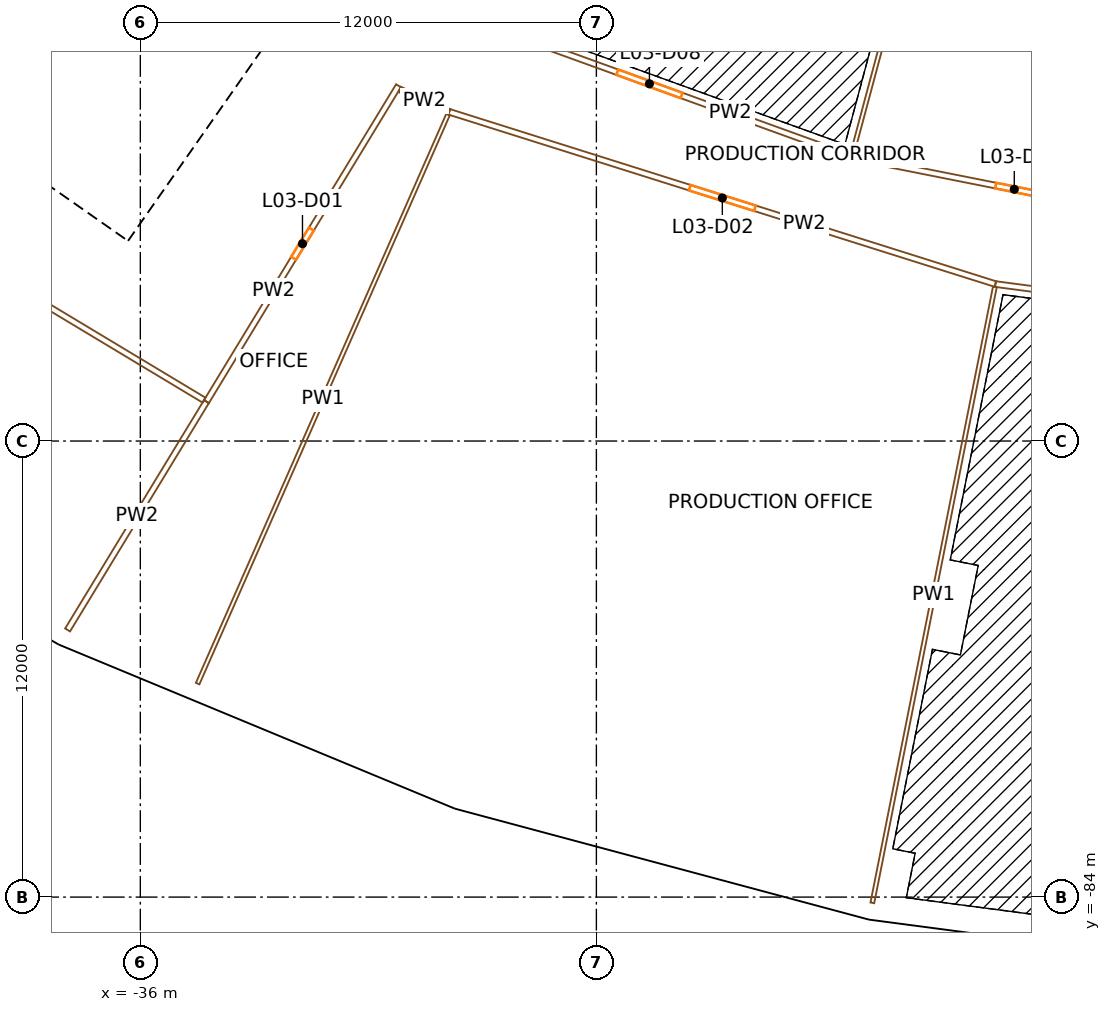
"""IFC4 building model, lengths in metres.
Left out: names, types, materials, properties, quantities, classifications, styles, units other than length and angle.
Written with IfcOpenShell. Run it as: python <this file> out.ifc"""

import sys

from ifc_helpers import new_model, si_unit, direction, frame, frame_2d, origin, origin_2d, place, context, subcontext, project, spatial, rectangle, extrude, element, fill, save


model = new_model("IFC4")
c1 = context("Model", 3, precision=1e-05, world=origin(), true_north=direction((0.0, 1.0)))
c2 = subcontext(c1, "Body", "Model", "MODEL_VIEW")
j1 = project(units=[si_unit("LENGTHUNIT", "METRE"), si_unit("PLANEANGLEUNIT", "RADIAN")], contexts=[c1])
p1 = place(None, origin())
s1 = spatial("IfcSite", under=j1, at=p1, CompositionType="ELEMENT")
p2 = place(p1, origin())
s2 = spatial("IfcBuilding", under=s1, at=p2, CompositionType="ELEMENT")
p3 = place(p2, frame((0.0, 0.0, 27.0)))
s3 = spatial("IfcBuildingStorey", under=s2, at=p3, CompositionType="ELEMENT", Elevation=27.0)
p4 = place(p3, frame((-34.388, -69.732, 0.0), z_axis=(0.0, 0.0, 1.0), x_axis=(0.896872741533, -0.442288690219, 0.0)))
e1 = element("IfcColumn", 1, at=p4, inside=s3, PredefinedType="COLUMN", context=c2, shape_type="SweptSolid", body=[
    extrude(rectangle(XDim=1.4, YDim=1.8, at=origin_2d()), origin(), (0.0, 0.0, 1.0), 4.5),
])
p5 = place(p3, frame((-37.705, -76.458, 0.0), z_axis=(0.0, 0.0, 1.0), x_axis=(0.896872741533, -0.442288690219, 0.0)))
e2 = element("IfcColumn", 2, at=p5, inside=s3, PredefinedType="COLUMN", context=c2, shape_type="SweptSolid", body=[
    extrude(rectangle(XDim=1.1, YDim=1.3, at=origin_2d()), origin(), (0.0, 0.0, 1.0), 4.5),
])
p6 = place(p3, frame((-24.992, -73.624, 0.0), z_axis=(0.0, 0.0, 1.0), x_axis=(0.946930129495, -0.321439465303, 0.0)))
e3 = element("IfcColumn", 3, at=p6, inside=s3, PredefinedType="COLUMN", context=c2, shape_type="SweptSolid", body=[
    extrude(rectangle(XDim=1.4, YDim=1.8, at=origin_2d()), origin(), (0.0, 0.0, 1.0), 4.5),
])
p7 = place(p3, frame((-27.403, -80.726, 0.0), z_axis=(0.0, 0.0, 1.0), x_axis=(0.946930129495, -0.321439465303, 0.0)))
e4 = element("IfcColumn", 4, at=p7, inside=s3, PredefinedType="COLUMN", context=c2, shape_type="SweptSolid", body=[
    extrude(rectangle(XDim=1.1, YDim=1.3, at=origin_2d()), origin(), (0.0, 0.0, 1.0), 4.5),
])
p8 = place(p3, frame((-15.168, -76.256, 0.0), z_axis=(0.0, 0.0, 1.0), x_axis=(0.980785280403, -0.195090322016, 0.0)))
e5 = element("IfcColumn", 5, at=p8, inside=s3, PredefinedType="COLUMN", context=c2, shape_type="SweptSolid", body=[
    extrude(rectangle(XDim=1.4, YDim=1.8, at=origin_2d()), origin(), (0.0, 0.0, 1.0), 4.5),
])
p9 = place(p3, frame((-16.631, -83.612, 0.0), z_axis=(0.0, 0.0, 1.0), x_axis=(0.980785280403, -0.195090322016, 0.0)))
e6 = element("IfcColumn", 6, at=p9, inside=s3, PredefinedType="COLUMN", context=c2, shape_type="SweptSolid", body=[
    extrude(rectangle(XDim=1.1, YDim=1.3, at=origin_2d()), origin(), (0.0, 0.0, 1.0), 4.5),
])
p10 = place(p3, frame((-36.717, -66.337, 0.0), z_axis=(0.0, 0.0, 1.0), x_axis=(0.573577477574, 0.819151315216, 0.0)))
e7 = element("IfcWall", 7, at=p10, inside=s3, PredefinedType="SHEAR", context=c2, shape_type="SweptSolid", body=[
    extrude(rectangle(XDim=14.8, YDim=0.9, at=frame_2d((7.4, 0.0))), origin(), (0.0, 0.0, 1.0), 4.1),
])
p11 = place(p10, frame((6.2, 0.0, 0.0)))
e8 = element("IfcOpeningElement", 8, at=p11, cuts=e7, PredefinedType="OPENING", context=c2, shape_type="SweptSolid", body=[
    extrude(rectangle(XDim=2.4, YDim=2.1, at=frame_2d((1.2, 1.05))), frame((0.0, 0.46, 0.0), z_axis=(0.0, -1.0, 0.0), x_axis=(1.0, 0.0, 0.0)), (0.0, 0.0, 1.0), 0.92),
])
p12 = place(p3, frame((-36.827, -65.71, 0.0), z_axis=(0.0, 0.0, 1.0), x_axis=(-0.819153391756, 0.573574511963, 0.0)))
e9 = element("IfcWall", 9, at=p12, inside=s3, PredefinedType="SHEAR", context=c2, shape_type="SweptSolid", body=[
    extrude(rectangle(XDim=15.045, YDim=0.9, at=frame_2d((7.523, 0.0))), origin(), (0.0, 0.0, 1.0), 4.1),
])
p13 = place(p12, frame((1.05, 0.0, 0.0)))
e10 = element("IfcOpeningElement", 10, at=p13, cuts=e9, PredefinedType="OPENING", context=c2, shape_type="SweptSolid", body=[
    extrude(rectangle(XDim=1.0, YDim=2.1, at=frame_2d((0.5, 1.05))), frame((0.0, 0.46, 0.0), z_axis=(0.0, -1.0, 0.0), x_axis=(1.0, 0.0, 0.0)), (0.0, 0.0, 1.0), 0.92),
])
p14 = place(p12, frame((3.625, 0.0, 0.0)))
e11 = element("IfcOpeningElement", 11, at=p14, cuts=e9, PredefinedType="OPENING", context=c2, shape_type="SweptSolid", body=[
    extrude(rectangle(XDim=1.0, YDim=2.1, at=frame_2d((0.5, 1.05))), frame((0.0, 0.46, 0.0), z_axis=(0.0, -1.0, 0.0), x_axis=(1.0, 0.0, 0.0)), (0.0, 0.0, 1.0), 0.92),
])
p15 = place(p12, frame((6.075, 0.0, 0.0)))
e12 = element("IfcOpeningElement", 12, at=p15, cuts=e9, PredefinedType="OPENING", context=c2, shape_type="SweptSolid", body=[
    extrude(rectangle(XDim=1.0, YDim=2.1, at=frame_2d((0.5, 1.05))), frame((0.0, 0.46, 0.0), z_axis=(0.0, -1.0, 0.0), x_axis=(1.0, 0.0, 0.0)), (0.0, 0.0, 1.0), 0.92),
])
p16 = place(p12, frame((13.495, 0.0, 0.0)))
e13 = element("IfcOpeningElement", 13, at=p16, cuts=e9, PredefinedType="OPENING", context=c2, shape_type="SweptSolid", body=[
    extrude(rectangle(XDim=1.1, YDim=2.1, at=frame_2d((0.55, 1.05))), frame((0.0, 0.46, 0.0), z_axis=(0.0, -1.0, 0.0), x_axis=(1.0, 0.0, 0.0)), (0.0, 0.0, 1.0), 0.92),
])
p17 = place(p3, frame((-35.221, -63.417, 0.0), z_axis=(0.0, 0.0, 1.0), x_axis=(-0.819166993208, 0.573555086491, 0.0)))
e14 = element("IfcWall", 14, at=p17, inside=s3, PredefinedType="SOLIDWALL", context=c2, shape_type="SweptSolid", body=[
    extrude(rectangle(XDim=7.95, YDim=0.3, at=frame_2d((3.975, 0.0))), origin(), (0.0, 0.0, 1.0), 4.1),
])
p18 = place(p3, frame((-37.929, -61.704, 0.0), z_axis=(0.0, 0.0, 1.0), x_axis=(-0.573559170999, -0.819164133348, 0.0)))
e15 = element("IfcWall", 15, at=p18, inside=s3, PredefinedType="PLUMBINGWALL", context=c2, shape_type="SweptSolid", body=[
    extrude(rectangle(XDim=2.2, YDim=0.1, at=frame_2d((1.1, 0.0))), origin(), (0.0, 0.0, 1.0), 4.1),
])
p19 = place(p3, frame((-47.819, -71.512, 0.0), z_axis=(0.0, 0.0, 1.0), x_axis=(0.866024577697, -0.500001430823, 0.0)))
e16 = element("IfcWall", 16, at=p19, inside=s3, PredefinedType="SOLIDWALL", context=c2, shape_type="SweptSolid", body=[
    extrude(rectangle(XDim=11.312, YDim=0.45, at=frame_2d((5.656, 0.0))), origin(), (0.0, 0.0, 1.0), 3.2),
])
p20 = place(p19, frame((4.006, 0.0, 0.9)))
e17 = element("IfcOpeningElement", 17, at=p20, cuts=e16, PredefinedType="OPENING", context=c2, shape_type="SweptSolid", body=[
    extrude(rectangle(XDim=1.2, YDim=2.15, at=frame_2d((0.6, 1.075))), frame((0.0, 0.235, 0.0), z_axis=(0.0, -1.0, 0.0), x_axis=(1.0, 0.0, 0.0)), (0.0, 0.0, 1.0), 0.47),
])
p21 = place(p19, frame((6.106, 0.0, 0.9)))
e18 = element("IfcOpeningElement", 18, at=p21, cuts=e16, PredefinedType="OPENING", context=c2, shape_type="SweptSolid", body=[
    extrude(rectangle(XDim=1.2, YDim=2.15, at=frame_2d((0.6, 1.075))), frame((0.0, 0.235, 0.0), z_axis=(0.0, -1.0, 0.0), x_axis=(1.0, 0.0, 0.0)), (0.0, 0.0, 1.0), 0.47),
])
p22 = place(p3, frame((-37.993, -77.176, 0.0), z_axis=(0.0, 0.0, 1.0), x_axis=(0.923874126662, -0.382696482978, 0.0)))
e19 = element("IfcWall", 19, at=p22, inside=s3, PredefinedType="SOLIDWALL", context=c2, shape_type="SweptSolid", body=[
    extrude(rectangle(XDim=11.135, YDim=0.45, at=frame_2d((5.567, 0.0))), origin(), (0.0, 0.0, 1.0), 3.2),
])
p23 = place(p22, frame((3.917, 0.0, 0.9)))
e20 = element("IfcOpeningElement", 20, at=p23, cuts=e19, PredefinedType="OPENING", context=c2, shape_type="SweptSolid", body=[
    extrude(rectangle(XDim=1.2, YDim=2.15, at=frame_2d((0.6, 1.075))), frame((0.0, 0.235, 0.0), z_axis=(0.0, -1.0, 0.0), x_axis=(1.0, 0.0, 0.0)), (0.0, 0.0, 1.0), 0.47),
])
p24 = place(p22, frame((6.017, 0.0, 0.9)))
e21 = element("IfcOpeningElement", 21, at=p24, cuts=e19, PredefinedType="OPENING", context=c2, shape_type="SweptSolid", body=[
    extrude(rectangle(XDim=1.2, YDim=2.15, at=frame_2d((0.6, 1.075))), frame((0.0, 0.235, 0.0), z_axis=(0.0, -1.0, 0.0), x_axis=(1.0, 0.0, 0.0)), (0.0, 0.0, 1.0), 0.47),
])
p25 = place(p3, frame((-27.681, -81.451, 0.0), z_axis=(0.0, 0.0, 1.0), x_axis=(0.965923678926, -0.258827059038, 0.0)))
e22 = element("IfcWall", 22, at=p25, inside=s3, PredefinedType="SOLIDWALL", context=c2, shape_type="SweptSolid", body=[
    extrude(rectangle(XDim=11.312, YDim=0.45, at=frame_2d((5.656, 0.0))), origin(), (0.0, 0.0, 1.0), 3.2),
])
p26 = place(p25, frame((4.006, 0.0, 0.9)))
e23 = element("IfcOpeningElement", 23, at=p26, cuts=e22, PredefinedType="OPENING", context=c2, shape_type="SweptSolid", body=[
    extrude(rectangle(XDim=1.2, YDim=2.15, at=frame_2d((0.6, 1.075))), frame((0.0, 0.235, 0.0), z_axis=(0.0, -1.0, 0.0), x_axis=(1.0, 0.0, 0.0)), (0.0, 0.0, 1.0), 0.47),
])
p27 = place(p25, frame((6.106, 0.0, 0.9)))
e24 = element("IfcOpeningElement", 24, at=p27, cuts=e22, PredefinedType="OPENING", context=c2, shape_type="SweptSolid", body=[
    extrude(rectangle(XDim=1.2, YDim=2.15, at=frame_2d((0.6, 1.075))), frame((0.0, 0.235, 0.0), z_axis=(0.0, -1.0, 0.0), x_axis=(1.0, 0.0, 0.0)), (0.0, 0.0, 1.0), 0.47),
])
p28 = place(p3, frame((-16.724, -84.379, 0.0), z_axis=(0.0, 0.0, 1.0), x_axis=(0.991447502826, -0.130506126829, 0.0)))
e25 = element("IfcWall", 25, at=p28, inside=s3, PredefinedType="SOLIDWALL", context=c2, shape_type="SweptSolid", body=[
    extrude(rectangle(XDim=11.135, YDim=0.45, at=frame_2d((5.567, 0.0))), origin(), (0.0, 0.0, 1.0), 3.2),
])
p29 = place(p28, frame((3.917, 0.0, 0.9)))
e26 = element("IfcOpeningElement", 26, at=p29, cuts=e25, PredefinedType="OPENING", context=c2, shape_type="SweptSolid", body=[
    extrude(rectangle(XDim=1.2, YDim=2.15, at=frame_2d((0.6, 1.075))), frame((0.0, 0.235, 0.0), z_axis=(0.0, -1.0, 0.0), x_axis=(1.0, 0.0, 0.0)), (0.0, 0.0, 1.0), 0.47),
])
p30 = place(p28, frame((6.017, 0.0, 0.9)))
e27 = element("IfcOpeningElement", 27, at=p30, cuts=e25, PredefinedType="OPENING", context=c2, shape_type="SweptSolid", body=[
    extrude(rectangle(XDim=1.2, YDim=2.15, at=frame_2d((0.6, 1.075))), frame((0.0, 0.235, 0.0), z_axis=(0.0, -1.0, 0.0), x_axis=(1.0, 0.0, 0.0)), (0.0, 0.0, 1.0), 0.47),
])
p31 = place(p3, frame((-34.324, -70.924, 0.0), z_axis=(0.0, 0.0, 1.0), x_axis=(-0.857078823531, 0.51518529701, 0.0)))
e28 = element("IfcWall", 28, at=p31, inside=s3, PredefinedType="PARTITIONING", context=c2, shape_type="SweptSolid", body=[
    extrude(rectangle(XDim=14.315, YDim=0.15, at=frame_2d((7.158, 0.0))), origin(), (0.0, 0.0, 1.0), 3.1),
])
p32 = place(p31, frame((6.657, 0.0, 0.0)))
e29 = element("IfcOpeningElement", 29, at=p32, cuts=e28, PredefinedType="OPENING", context=c2, shape_type="SweptSolid", body=[
    extrude(rectangle(XDim=1.0, YDim=2.1, at=frame_2d((0.5, 1.05))), frame((0.0, 0.085, 0.0), z_axis=(0.0, -1.0, 0.0), x_axis=(1.0, 0.0, 0.0)), (0.0, 0.0, 1.0), 0.17),
])
p33 = place(p3, frame((-34.492, -78.383, 0.0), z_axis=(0.0, 0.0, 1.0), x_axis=(0.402767118416, 0.915302490067, 0.0)))
e30 = element("IfcWall", 30, at=p33, inside=s3, PredefinedType="PARTITIONING", context=c2, shape_type="SweptSolid", body=[
    extrude(rectangle(XDim=16.361, YDim=0.1, at=frame_2d((8.18, 0.0))), origin(), (0.0, 0.0, 1.0), 3.1),
])
p34 = place(p3, frame((-34.26, -70.963, 0.0), z_axis=(0.0, 0.0, 1.0), x_axis=(-0.519582317334, -0.854420397412, 0.0)))
e31 = element("IfcWall", 31, at=p34, inside=s3, PredefinedType="PARTITIONING", context=c2, shape_type="SweptSolid", body=[
    extrude(rectangle(XDim=7.032, YDim=0.15, at=frame_2d((3.516, 0.0))), origin(), (0.0, 0.0, 1.0), 3.1),
])
p35 = place(p3, frame((-29.207, -62.652, 0.0), z_axis=(0.0, 0.0, 1.0), x_axis=(-0.519573423316, -0.854425805897, 0.0)))
e32 = element("IfcWall", 32, at=p35, inside=s3, PredefinedType="PARTITIONING", context=c2, shape_type="SweptSolid", body=[
    extrude(rectangle(XDim=9.726, YDim=0.15, at=frame_2d((4.863, 0.0))), origin(), (0.0, 0.0, 1.0), 3.1),
])
p36 = place(p35, frame((4.413, 0.0, 0.0)))
e33 = element("IfcOpeningElement", 33, at=p36, cuts=e32, PredefinedType="OPENING", context=c2, shape_type="SweptSolid", body=[
    extrude(rectangle(XDim=0.9, YDim=2.1, at=frame_2d((0.45, 1.05))), frame((0.0, 0.085, 0.0), z_axis=(0.0, -1.0, 0.0), x_axis=(1.0, 0.0, 0.0)), (0.0, 0.0, 1.0), 0.17),
])
p37 = place(p3, frame((-29.177, -62.747, 0.0), z_axis=(0.0, 0.0, 1.0), x_axis=(0.91081521274, -0.41281430237, 0.0)))
e34 = element("IfcWall", 34, at=p37, inside=s3, PredefinedType="PARTITIONING", context=c2, shape_type="SweptSolid", body=[
    extrude(rectangle(XDim=1.433, YDim=0.15, at=frame_2d((0.716, 0.0))), origin(), (0.0, 0.0, 1.0), 3.1),
])
p38 = place(p3, frame((-27.92, -60.678, 0.0), z_axis=(0.0, 0.0, 1.0), x_axis=(0.940369024046, -0.340155991589, 0.0)))
e35 = element("IfcWall", 35, at=p38, inside=s3, PredefinedType="PARTITIONING", context=c2, shape_type="SweptSolid", body=[
    extrude(rectangle(XDim=11.305, YDim=0.15, at=frame_2d((5.652, 0.0))), origin(), (0.0, 0.0, 1.0), 3.1),
])
p39 = place(p38, frame((4.752, 0.0, 0.0)))
e36 = element("IfcOpeningElement", 36, at=p39, cuts=e35, PredefinedType="OPENING", context=c2, shape_type="SweptSolid", body=[
    extrude(rectangle(XDim=1.8, YDim=2.1, at=frame_2d((0.9, 1.05))), frame((0.0, 0.085, 0.0), z_axis=(0.0, -1.0, 0.0), x_axis=(1.0, 0.0, 0.0)), (0.0, 0.0, 1.0), 0.17),
])
p40 = place(p3, frame((-13.5, -67.87, 0.0), z_axis=(0.0, 0.0, 1.0), x_axis=(-0.953714063006, 0.300714958099, 0.0)))
e37 = element("IfcWall", 37, at=p40, inside=s3, PredefinedType="PARTITIONING", context=c2, shape_type="SweptSolid", body=[
    extrude(rectangle(XDim=15.069, YDim=0.15, at=frame_2d((7.535, 0.0))), origin(), (0.0, 0.0, 1.0), 3.1),
])
p41 = place(p40, frame((6.635, 0.0, 0.0)))
e38 = element("IfcOpeningElement", 38, at=p41, cuts=e37, PredefinedType="OPENING", context=c2, shape_type="SweptSolid", body=[
    extrude(rectangle(XDim=1.8, YDim=2.1, at=frame_2d((0.9, 1.05))), frame((0.0, 0.085, 0.0), z_axis=(0.0, -1.0, 0.0), x_axis=(1.0, 0.0, 0.0)), (0.0, 0.0, 1.0), 0.17),
])
p42 = place(p3, frame((-17.289, -64.524, 0.0), z_axis=(0.0, 0.0, 1.0), x_axis=(0.980786466832, -0.195084357342, 0.0)))
e39 = element("IfcWall", 39, at=p42, inside=s3, PredefinedType="PARTITIONING", context=c2, shape_type="SweptSolid", body=[
    extrude(rectangle(XDim=8.738, YDim=0.15, at=frame_2d((4.369, 0.0))), origin(), (0.0, 0.0, 1.0), 3.1),
])
p43 = place(p42, frame((3.869, 0.0, 0.0)))
e40 = element("IfcOpeningElement", 40, at=p43, cuts=e39, PredefinedType="OPENING", context=c2, shape_type="SweptSolid", body=[
    extrude(rectangle(XDim=1.0, YDim=2.1, at=frame_2d((0.5, 1.05))), frame((0.0, 0.085, 0.0), z_axis=(0.0, -1.0, 0.0), x_axis=(1.0, 0.0, 0.0)), (0.0, 0.0, 1.0), 0.17),
])
p44 = place(p3, frame((-16.739, -84.151, 0.0), z_axis=(0.0, 0.0, 1.0), x_axis=(0.195090372882, 0.980785270285, 0.0)))
e41 = element("IfcWall", 41, at=p44, inside=s3, PredefinedType="PARTITIONING", context=c2, shape_type="SweptSolid", body=[
    extrude(rectangle(XDim=16.525, YDim=0.1, at=frame_2d((8.263, 0.0))), origin(), (0.0, 0.0, 1.0), 3.1),
])
p45 = place(p3, frame((-4.526, -69.052, 0.0), z_axis=(0.0, 0.0, 1.0), x_axis=(-0.991446306881, 0.13051521203, 0.0)))
e42 = element("IfcWall", 42, at=p45, inside=s3, PredefinedType="PARTITIONING", context=c2, shape_type="SweptSolid", body=[
    extrude(rectangle(XDim=9.052, YDim=0.15, at=frame_2d((4.526, 0.0))), origin(), (0.0, 0.0, 1.0), 3.1),
])
p46 = place(p45, frame((3.626, 0.0, 0.0)))
e43 = element("IfcOpeningElement", 43, at=p46, cuts=e42, PredefinedType="OPENING", context=c2, shape_type="SweptSolid", body=[
    extrude(rectangle(XDim=1.8, YDim=2.1, at=frame_2d((0.9, 1.05))), frame((0.0, 0.085, 0.0), z_axis=(0.0, -1.0, 0.0), x_axis=(1.0, 0.0, 0.0)), (0.0, 0.0, 1.0), 0.17),
])
p47 = place(p3, frame((-12.965, -48.386, 0.0), z_axis=(0.0, 0.0, 1.0), x_axis=(-0.258824622624, -0.965924331779, 0.0)))
e44 = element("IfcWall", 44, at=p47, inside=s3, PredefinedType="PARTITIONING", context=c2, shape_type="SweptSolid", body=[
    extrude(rectangle(XDim=16.632, YDim=0.1, at=frame_2d((8.316, 0.0))), origin(), (0.0, 0.0, 1.0), 3.1),
])
p48 = place(p13, origin())
e45 = element("IfcDoor", 45, at=p48, inside=s3, OperationType="SINGLE_SWING_LEFT", PredefinedType="DOOR", context=c2, shape_type="SweptSolid", body=[
    extrude(rectangle(XDim=1.0, YDim=2.1, at=frame_2d((0.5, 1.05))), frame((0.0, 0.025, 0.0), z_axis=(0.0, -1.0, 0.0), x_axis=(1.0, 0.0, 0.0)), (0.0, 0.0, 1.0), 0.05),
])
fill(e10, e45)
p49 = place(p23, origin())
e46 = element("IfcWindow", 46, at=p49, inside=s3, PartitioningType="SINGLE_PANEL", PredefinedType="WINDOW", context=c2, shape_type="SweptSolid", body=[
    extrude(rectangle(XDim=1.2, YDim=2.15, at=frame_2d((0.6, 1.075))), frame((0.0, 0.03, 0.0), z_axis=(0.0, -1.0, 0.0), x_axis=(1.0, 0.0, 0.0)), (0.0, 0.0, 1.0), 0.06),
])
fill(e20, e46)
p50 = place(p24, origin())
e47 = element("IfcWindow", 47, at=p50, inside=s3, PartitioningType="SINGLE_PANEL", PredefinedType="WINDOW", context=c2, shape_type="SweptSolid", body=[
    extrude(rectangle(XDim=1.2, YDim=2.15, at=frame_2d((0.6, 1.075))), frame((0.0, 0.03, 0.0), z_axis=(0.0, -1.0, 0.0), x_axis=(1.0, 0.0, 0.0)), (0.0, 0.0, 1.0), 0.06),
])
fill(e21, e47)
p51 = place(p26, origin())
e48 = element("IfcWindow", 48, at=p51, inside=s3, PartitioningType="SINGLE_PANEL", PredefinedType="WINDOW", context=c2, shape_type="SweptSolid", body=[
    extrude(rectangle(XDim=1.2, YDim=2.15, at=frame_2d((0.6, 1.075))), frame((0.0, 0.03, 0.0), z_axis=(0.0, -1.0, 0.0), x_axis=(1.0, 0.0, 0.0)), (0.0, 0.0, 1.0), 0.06),
])
fill(e23, e48)
p52 = place(p27, origin())
e49 = element("IfcWindow", 49, at=p52, inside=s3, PartitioningType="SINGLE_PANEL", PredefinedType="WINDOW", context=c2, shape_type="SweptSolid", body=[
    extrude(rectangle(XDim=1.2, YDim=2.15, at=frame_2d((0.6, 1.075))), frame((0.0, 0.03, 0.0), z_axis=(0.0, -1.0, 0.0), x_axis=(1.0, 0.0, 0.0)), (0.0, 0.0, 1.0), 0.06),
])
fill(e24, e49)
p53 = place(p29, origin())
e50 = element("IfcWindow", 50, at=p53, inside=s3, PartitioningType="SINGLE_PANEL", PredefinedType="WINDOW", context=c2, shape_type="SweptSolid", body=[
    extrude(rectangle(XDim=1.2, YDim=2.15, at=frame_2d((0.6, 1.075))), frame((0.0, 0.03, 0.0), z_axis=(0.0, -1.0, 0.0), x_axis=(1.0, 0.0, 0.0)), (0.0, 0.0, 1.0), 0.06),
])
fill(e26, e50)
p54 = place(p36, origin())
e51 = element("IfcDoor", 51, at=p54, inside=s3, OperationType="SINGLE_SWING_RIGHT", PredefinedType="DOOR", context=c2, shape_type="SweptSolid", body=[
    extrude(rectangle(XDim=0.9, YDim=2.1, at=frame_2d((0.45, 1.05))), frame((0.0, 0.025, 0.0), z_axis=(0.0, -1.0, 0.0), x_axis=(1.0, 0.0, 0.0)), (0.0, 0.0, 1.0), 0.05),
])
fill(e33, e51)
p55 = place(p41, origin())
e52 = element("IfcDoor", 52, at=p55, inside=s3, OperationType="DOUBLE_DOOR_SINGLE_SWING", PredefinedType="DOOR", context=c2, shape_type="SweptSolid", body=[
    extrude(rectangle(XDim=1.8, YDim=2.1, at=frame_2d((0.9, 1.05))), frame((0.0, 0.025, 0.0), z_axis=(0.0, -1.0, 0.0), x_axis=(1.0, 0.0, 0.0)), (0.0, 0.0, 1.0), 0.05),
])
fill(e38, e52)
p56 = place(p39, origin())
e53 = element("IfcDoor", 53, at=p56, inside=s3, OperationType="DOUBLE_DOOR_SINGLE_SWING", PredefinedType="DOOR", context=c2, shape_type="SweptSolid", body=[
    extrude(rectangle(XDim=1.8, YDim=2.1, at=frame_2d((0.9, 1.05))), frame((0.0, 0.025, 0.0), z_axis=(0.0, -1.0, 0.0), x_axis=(1.0, 0.0, 0.0)), (0.0, 0.0, 1.0), 0.05),
])
fill(e36, e53)
p57 = place(p43, origin())
e54 = element("IfcDoor", 54, at=p57, inside=s3, OperationType="SINGLE_SWING_RIGHT", PredefinedType="DOOR", context=c2, shape_type="SweptSolid", body=[
    extrude(rectangle(XDim=1.0, YDim=2.1, at=frame_2d((0.5, 1.05))), frame((0.0, 0.025, 0.0), z_axis=(0.0, -1.0, 0.0), x_axis=(1.0, 0.0, 0.0)), (0.0, 0.0, 1.0), 0.05),
])
fill(e40, e54)
save(model, sys.argv[1])
